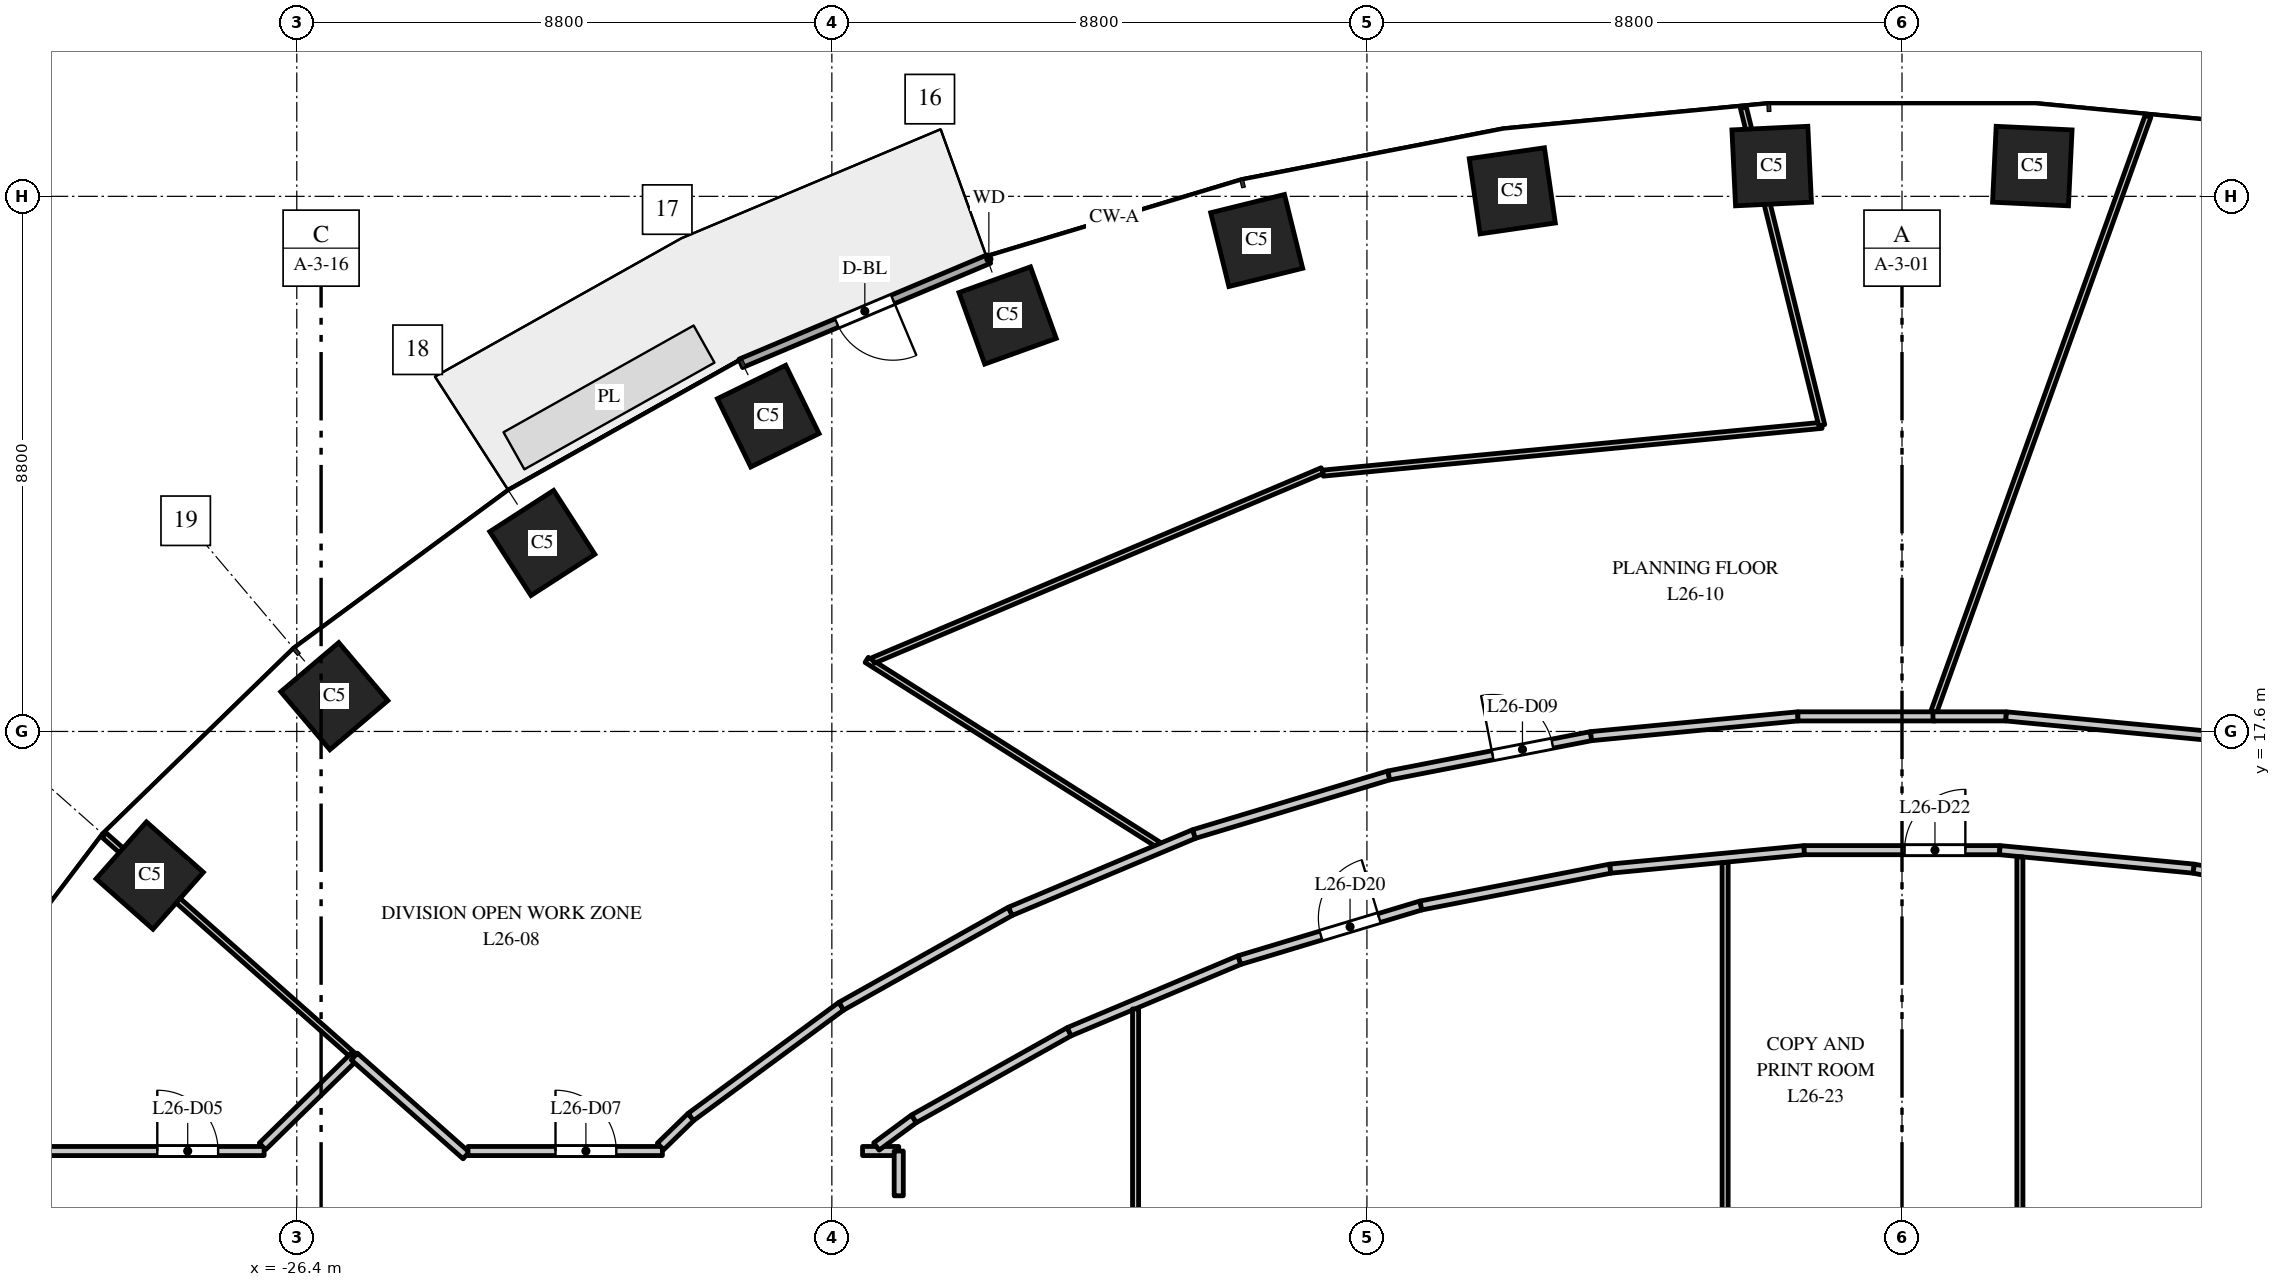
"""IFC4 building model, lengths in metres.
Left out: names, types, materials, properties, quantities, classifications, styles, units other than length and angle.
Written with IfcOpenShell. Run it as: python <this file> out.ifc"""

import sys

from ifc_helpers import new_model, si_unit, direction, frame, frame_2d, origin, origin_2d, place, context, subcontext, project, spatial, rectangle, extrude, element, fill, save


model = new_model("IFC4")
c1 = context("Model", 3, precision=1e-05, world=origin(), true_north=direction((0.0, 1.0)))
c2 = subcontext(c1, "Body", "Model", "MODEL_VIEW")
j1 = project(units=[si_unit("LENGTHUNIT", "METRE"), si_unit("PLANEANGLEUNIT", "RADIAN")], contexts=[c1])
p1 = place(None, origin())
s1 = spatial("IfcSite", under=j1, at=p1, CompositionType="ELEMENT")
p2 = place(p1, origin())
s2 = spatial("IfcBuilding", under=s1, at=p2, CompositionType="ELEMENT")
p3 = place(p2, frame((0.0, 0.0, 116.0)))
s3 = spatial("IfcBuildingStorey", under=s2, at=p3, CompositionType="ELEMENT", Elevation=116.0)
for number, where, z_axis, x_axis in (
    (1, (2.143, 26.898, 0.0), (0.0, 0.0, 1.0), (-0.999, 0.048, 0.0)),
    (2, (-2.143, 26.898, 0.0), (0.0, 0.0, 1.0), (-0.999, -0.048, 0.0)),
    (3, (-6.409, 26.491, 0.0), (0.0, 0.0, 1.0), (-0.99, -0.143, 0.0)),
    (4, (-10.613, 25.674, 0.0), (0.0, 0.0, 1.0), (-0.971, -0.24, 0.0)),
    (5, (-14.709, 24.441, 0.0), (0.0, 0.0, 1.0), (-0.941, -0.338, 0.0)),
    (6, (-18.646, 22.785, 0.0), (0.0, 0.0, 1.0), (-0.898, -0.439, 0.0)),
    (7, (-22.362, 20.7, 0.0), (0.0, 0.0, 1.0), (-0.84, -0.542, 0.0)),
    (8, (-25.783, 18.18, 0.0), (0.0, 0.0, 1.0), (-0.763, -0.646, 0.0)),
    (9, (-28.819, 15.23, 0.0), (0.0, 0.0, 1.0), (-0.663, -0.749, 0.0)),
):
    element("IfcColumn", number, at=place(p3, frame(where, z_axis=z_axis, x_axis=x_axis)), inside=s3, PredefinedType="COLUMN", context=c2, shape_type="SweptSolid", body=[
        extrude(rectangle(XDim=1.25, YDim=1.25, at=origin_2d()), origin(), (0.0, 0.0, 1.0), 4.0),
    ])
p4 = place(p3, frame((-15.018, 25.369, 0.0), z_axis=(0.0, 0.0, 1.0), x_axis=(-0.921816985161, -0.387625393736, 0.0)))
e10 = element("IfcWall", 10, at=p4, inside=s3, PredefinedType="STANDARD", context=c2, shape_type="SweptSolid", body=[
    extrude(rectangle(XDim=4.426, YDim=0.15, at=frame_2d((2.213, 0.0))), origin(), (0.0, 0.0, 1.0), 3.7),
])
p5 = place(p4, frame((1.713, 0.0, 0.0)))
e11 = element("IfcOpeningElement", 11, at=p5, cuts=e10, PredefinedType="OPENING", context=c2, shape_type="SweptSolid", body=[
    extrude(rectangle(XDim=1.0, YDim=2.4, at=frame_2d((0.5, 1.2))), frame((0.0, 0.085, 0.0), z_axis=(0.0, -1.0, 0.0), x_axis=(1.0, 0.0, 0.0)), (0.0, 0.0, 1.0), 0.17),
])
p6 = place(p3, frame((-31.5, 10.7, 0.0), z_axis=(0.0, 0.0, 1.0), x_axis=(1.0, 0.0, 0.0)))
e12 = element("IfcWall", 12, at=p6, inside=s3, PredefinedType="PARTITIONING", context=c2, shape_type="SweptSolid", body=[
    extrude(rectangle(XDim=4.563, YDim=0.15, at=frame_2d((2.281, 0.0))), origin(), (0.0, 0.0, 1.0), 3.1),
])
p7 = place(p6, frame((2.806, 0.0, 0.0)))
e13 = element("IfcOpeningElement", 13, at=p7, cuts=e12, PredefinedType="OPENING", context=c2, shape_type="SweptSolid", body=[
    extrude(rectangle(XDim=1.0, YDim=2.1, at=frame_2d((0.5, 1.05))), frame((0.0, 0.085, 0.0), z_axis=(0.0, -1.0, 0.0), x_axis=(1.0, 0.0, 0.0)), (0.0, 0.0, 1.0), 0.17),
])
p8 = place(p3, frame((-29.569, 15.895, 0.0), z_axis=(0.0, 0.0, 1.0), x_axis=(0.74891259533, -0.662668789484, 0.0)))
e14 = element("IfcWall", 14, at=p8, inside=s3, PredefinedType="PARTITIONING", context=c2, shape_type="SweptSolid", body=[
    extrude(rectangle(XDim=5.495, YDim=0.1, at=frame_2d((2.747, 0.0))), origin(), (0.0, 0.0, 1.0), 2.9),
])
p9 = place(p3, frame((-26.964, 10.777, 0.0), z_axis=(0.0, 0.0, 1.0), x_axis=(0.714923203438, 0.699202984251, 0.0)))
e15 = element("IfcWall", 15, at=p9, inside=s3, PredefinedType="PARTITIONING", context=c2, shape_type="SweptSolid", body=[
    extrude(rectangle(XDim=2.112, YDim=0.15, at=frame_2d((1.056, 0.0))), origin(), (0.0, 0.0, 1.0), 3.7),
])
p10 = place(p3, frame((-25.454, 12.254, 0.0), z_axis=(0.0, 0.0, 1.0), x_axis=(0.74918446265, -0.662361412617, 0.0)))
e16 = element("IfcWall", 16, at=p10, inside=s3, PredefinedType="PARTITIONING", context=c2, shape_type="SweptSolid", body=[
    extrude(rectangle(XDim=2.455, YDim=0.15, at=frame_2d((1.228, 0.0))), origin(), (0.0, 0.0, 1.0), 3.7),
])
p11 = place(p3, frame((-23.584, 10.7, 0.0), z_axis=(0.0, 0.0, 1.0), x_axis=(1.0, 0.0, 0.0)))
e17 = element("IfcWall", 17, at=p11, inside=s3, PredefinedType="PARTITIONING", context=c2, shape_type="SweptSolid", body=[
    extrude(rectangle(XDim=3.197, YDim=0.15, at=frame_2d((1.599, 0.0))), origin(), (0.0, 0.0, 1.0), 3.7),
])
p12 = place(p11, frame((1.439, 0.0, 0.0)))
e18 = element("IfcOpeningElement", 18, at=p12, cuts=e17, PredefinedType="OPENING", context=c2, shape_type="SweptSolid", body=[
    extrude(rectangle(XDim=1.0, YDim=2.1, at=frame_2d((0.5, 1.05))), frame((0.0, 0.085, 0.0), z_axis=(0.0, -1.0, 0.0), x_axis=(1.0, 0.0, 0.0)), (0.0, 0.0, 1.0), 0.17),
])
p13 = place(p3, frame((-20.418, 10.775, 0.0), z_axis=(0.0, 0.0, 1.0), x_axis=(0.717033879939, 0.697038316751, 0.0)))
e19 = element("IfcWall", 19, at=p13, inside=s3, PredefinedType="PARTITIONING", context=c2, shape_type="SweptSolid", body=[
    extrude(rectangle(XDim=0.696, YDim=0.15, at=frame_2d((0.348, 0.0))), origin(), (0.0, 0.0, 1.0), 3.7),
])
p14 = place(p3, frame((-19.919, 11.26, 0.0), z_axis=(0.0, 0.0, 1.0), x_axis=(0.805185638843, 0.593022838516, 0.0)))
e20 = element("IfcWall", 20, at=p14, inside=s3, PredefinedType="PARTITIONING", context=c2, shape_type="SweptSolid", body=[
    extrude(rectangle(XDim=3.073, YDim=0.15, at=frame_2d((1.536, 0.0))), origin(), (0.0, 0.0, 1.0), 2.75),
])
p15 = place(p3, frame((-17.445, 13.082, 0.0), z_axis=(0.0, 0.0, 1.0), x_axis=(0.872072095629, 0.489377420837, 0.0)))
e21 = element("IfcWall", 21, at=p15, inside=s3, PredefinedType="PARTITIONING", context=c2, shape_type="SweptSolid", body=[
    extrude(rectangle(XDim=3.188, YDim=0.15, at=frame_2d((1.594, 0.0))), origin(), (0.0, 0.0, 1.0), 3.7),
])
p16 = place(p3, frame((-17.027, 18.777, 0.0), z_axis=(0.0, 0.0, 1.0), x_axis=(0.844786602714, -0.535103350648, 0.0)))
e22 = element("IfcWall", 22, at=p16, inside=s3, PredefinedType="PARTITIONING", context=c2, shape_type="SweptSolid", body=[
    extrude(rectangle(XDim=5.664, YDim=0.1, at=frame_2d((2.832, 0.0))), origin(), (0.0, 0.0, 1.0), 2.85),
])
p17 = place(p3, frame((-16.92, 18.768, 0.0), z_axis=(0.0, 0.0, 1.0), x_axis=(0.921120541754, 0.389277468599, 0.0)))
e23 = element("IfcWall", 23, at=p17, inside=s3, PredefinedType="PARTITIONING", context=c2, shape_type="SweptSolid", body=[
    extrude(rectangle(XDim=8.02, YDim=0.1, at=frame_2d((4.01, 0.0))), origin(), (0.0, 0.0, 1.0), 2.85),
])
p18 = place(p3, frame((-17.095, 10.7, 0.0), z_axis=(0.0, 0.0, 1.0), x_axis=(1.0, 0.0, 0.0)))
e24 = element("IfcWall", 24, at=p18, inside=s3, PredefinedType="PARTITIONING", context=c2, shape_type="SweptSolid", body=[
    extrude(rectangle(XDim=0.595, YDim=0.15, at=frame_2d((0.297, 0.0))), origin(), (0.0, 0.0, 1.0), 3.7),
])
p19 = place(p3, frame((-16.867, 10.775, 0.0), z_axis=(0.0, 0.0, 1.0), x_axis=(0.804751563869, 0.593611759023, 0.0)))
e25 = element("IfcWall", 25, at=p19, inside=s3, PredefinedType="PARTITIONING", context=c2, shape_type="SweptSolid", body=[
    extrude(rectangle(XDim=0.767, YDim=0.15, at=frame_2d((0.383, 0.0))), origin(), (0.0, 0.0, 1.0), 3.7),
])
p20 = place(p3, frame((-16.5, 9.964, 0.0), z_axis=(0.0, 0.0, 1.0), x_axis=(0.0, 1.0, 0.0)))
e26 = element("IfcWall", 26, at=p20, inside=s3, PredefinedType="PARTITIONING", context=c2, shape_type="SweptSolid", body=[
    extrude(rectangle(XDim=0.736, YDim=0.15, at=frame_2d((0.368, 0.0))), origin(), (0.0, 0.0, 1.0), 3.7),
])
p21 = place(p3, frame((-16.25, 11.23, 0.0), z_axis=(0.0, 0.0, 1.0), x_axis=(0.872147381065, 0.489243237767, 0.0)))
e27 = element("IfcWall", 27, at=p21, inside=s3, PredefinedType="PARTITIONING", context=c2, shape_type="SweptSolid", body=[
    extrude(rectangle(XDim=2.927, YDim=0.15, at=frame_2d((1.464, 0.0))), origin(), (0.0, 0.0, 1.0), 2.75),
])
p22 = place(p3, frame((-14.665, 14.642, 0.0), z_axis=(0.0, 0.0, 1.0), x_axis=(0.921789499058, 0.38769075231, 0.0)))
e28 = element("IfcWall", 28, at=p22, inside=s3, PredefinedType="PARTITIONING", context=c2, shape_type="SweptSolid", body=[
    extrude(rectangle(XDim=3.278, YDim=0.15, at=frame_2d((1.639, 0.0))), origin(), (0.0, 0.0, 1.0), 2.85),
])
p23 = place(p3, frame((-13.697, 12.662, 0.0), z_axis=(0.0, 0.0, 1.0), x_axis=(0.921751821358, 0.387780324183, 0.0)))
e29 = element("IfcWall", 29, at=p23, inside=s3, PredefinedType="PARTITIONING", context=c2, shape_type="SweptSolid", body=[
    extrude(rectangle(XDim=3.038, YDim=0.15, at=frame_2d((1.519, 0.0))), origin(), (0.0, 0.0, 1.0), 2.85),
])
p24 = place(p3, frame((-12.605, -13.036, 0.0), z_axis=(0.0, 0.0, 1.0), x_axis=(0.0, 1.0, 0.0)))
e30 = element("IfcWall", 30, at=p24, inside=s3, PredefinedType="PARTITIONING", context=c2, shape_type="SweptSolid", body=[
    extrude(rectangle(XDim=26.072, YDim=0.1, at=frame_2d((13.036, 0.0))), origin(), (0.0, 0.0, 1.0), 2.75),
])
p25 = place(p3, frame((-11.643, 15.913, 0.0), z_axis=(0.0, 0.0, 1.0), x_axis=(0.957584891346, 0.288151307243, 0.0)))
e31 = element("IfcWall", 31, at=p25, inside=s3, PredefinedType="PARTITIONING", context=c2, shape_type="SweptSolid", body=[
    extrude(rectangle(XDim=3.345, YDim=0.15, at=frame_2d((1.672, 0.0))), origin(), (0.0, 0.0, 1.0), 3.7),
])
p26 = place(p3, frame((-10.897, 13.84, 0.0), z_axis=(0.0, 0.0, 1.0), x_axis=(0.957606118849, 0.28808075455, 0.0)))
e32 = element("IfcWall", 32, at=p26, inside=s3, PredefinedType="PARTITIONING", context=c2, shape_type="SweptSolid", body=[
    extrude(rectangle(XDim=3.117, YDim=0.15, at=frame_2d((1.559, 0.0))), origin(), (0.0, 0.0, 1.0), 3.7),
])
p27 = place(p26, frame((1.4, 0.0, 0.0)))
e33 = element("IfcOpeningElement", 33, at=p27, cuts=e32, PredefinedType="OPENING", context=c2, shape_type="SweptSolid", body=[
    extrude(rectangle(XDim=1.0, YDim=2.1, at=frame_2d((0.5, 1.05))), frame((0.0, 0.085, 0.0), z_axis=(0.0, -1.0, 0.0), x_axis=(1.0, 0.0, 0.0)), (0.0, 0.0, 1.0), 0.17),
])
p28 = place(p3, frame((-9.523, 21.848, 0.0), z_axis=(0.0, 0.0, 1.0), x_axis=(0.99544018458, 0.095387834251, 0.0)))
e34 = element("IfcWall", 34, at=p28, inside=s3, PredefinedType="PARTITIONING", context=c2, shape_type="SweptSolid", body=[
    extrude(rectangle(XDim=8.241, YDim=0.1, at=frame_2d((4.121, 0.0))), origin(), (0.0, 0.0, 1.0), 2.85),
])
p29 = place(p3, frame((-8.44, 16.877, 0.0), z_axis=(0.0, 0.0, 1.0), x_axis=(0.981665220565, 0.190613207134, 0.0)))
e35 = element("IfcWall", 35, at=p29, inside=s3, PredefinedType="PARTITIONING", context=c2, shape_type="SweptSolid", body=[
    extrude(rectangle(XDim=3.389, YDim=0.15, at=frame_2d((1.695, 0.0))), origin(), (0.0, 0.0, 1.0), 2.85),
])
p30 = place(p29, frame((1.739, 0.0, 0.0)))
e36 = element("IfcOpeningElement", 36, at=p30, cuts=e35, PredefinedType="OPENING", context=c2, shape_type="SweptSolid", body=[
    extrude(rectangle(XDim=1.0, YDim=2.1, at=frame_2d((0.5, 1.05))), frame((0.0, 0.085, 0.0), z_axis=(0.0, -1.0, 0.0), x_axis=(1.0, 0.0, 0.0)), (0.0, 0.0, 1.0), 0.17),
])
p31 = place(p3, frame((-7.912, 14.738, 0.0), z_axis=(0.0, 0.0, 1.0), x_axis=(0.981588545092, 0.191007665145, 0.0)))
e37 = element("IfcWall", 37, at=p31, inside=s3, PredefinedType="PARTITIONING", context=c2, shape_type="SweptSolid", body=[
    extrude(rectangle(XDim=3.172, YDim=0.15, at=frame_2d((1.586, 0.0))), origin(), (0.0, 0.0, 1.0), 2.85),
])
p32 = place(p3, frame((-5.113, 17.523, 0.0), z_axis=(0.0, 0.0, 1.0), x_axis=(0.995466844572, 0.095109207532, 0.0)))
e38 = element("IfcWall", 38, at=p32, inside=s3, PredefinedType="PARTITIONING", context=c2, shape_type="SweptSolid", body=[
    extrude(rectangle(XDim=3.417, YDim=0.15, at=frame_2d((1.708, 0.0))), origin(), (0.0, 0.0, 1.0), 3.7),
])
p33 = place(p3, frame((-4.798, 15.344, 0.0), z_axis=(0.0, 0.0, 1.0), x_axis=(0.995491705426, 0.09484863957, 0.0)))
e39 = element("IfcWall", 39, at=p33, inside=s3, PredefinedType="PARTITIONING", context=c2, shape_type="SweptSolid", body=[
    extrude(rectangle(XDim=3.205, YDim=0.15, at=frame_2d((1.602, 0.0))), origin(), (0.0, 0.0, 1.0), 3.7),
])
p34 = place(p3, frame((-2.909, 7.082, 0.0), z_axis=(0.0, 0.0, 1.0), x_axis=(0.0, 1.0, 0.0)))
e40 = element("IfcWall", 40, at=p34, inside=s3, PredefinedType="PARTITIONING", context=c2, shape_type="SweptSolid", body=[
    extrude(rectangle(XDim=8.363, YDim=0.1, at=frame_2d((4.182, 0.0))), origin(), (0.0, 0.0, 1.0), 2.9),
])
p35 = place(p3, frame((-2.609, 27.858, 0.0), z_axis=(0.0, 0.0, 1.0), x_axis=(0.239705454967, -0.970845659649, 0.0)))
e41 = element("IfcWall", 41, at=p35, inside=s3, PredefinedType="PARTITIONING", context=c2, shape_type="SweptSolid", body=[
    extrude(rectangle(XDim=5.381, YDim=0.1, at=frame_2d((2.69, 0.0))), origin(), (0.0, 0.0, 1.0), 2.85),
])
p36 = place(p3, frame((-1.712, 17.848, 0.0), z_axis=(0.0, 0.0, 1.0), x_axis=(1.0, 0.0, 0.0)))
e42 = element("IfcWall", 42, at=p36, inside=s3, PredefinedType="PARTITIONING", context=c2, shape_type="SweptSolid", body=[
    extrude(rectangle(XDim=2.262, YDim=0.15, at=frame_2d((1.131, 0.0))), origin(), (0.0, 0.0, 1.0), 2.85),
])
p37 = place(p3, frame((-1.608, 15.648, 0.0), z_axis=(0.0, 0.0, 1.0), x_axis=(1.0, 0.0, 0.0)))
e43 = element("IfcWall", 43, at=p37, inside=s3, PredefinedType="PARTITIONING", context=c2, shape_type="SweptSolid", body=[
    extrude(rectangle(XDim=3.216, YDim=0.15, at=frame_2d((1.608, 0.0))), origin(), (0.0, 0.0, 1.0), 2.85),
])
p38 = place(p37, frame((1.65, 0.0, 0.0)))
e44 = element("IfcOpeningElement", 44, at=p38, cuts=e43, PredefinedType="OPENING", context=c2, shape_type="SweptSolid", body=[
    extrude(rectangle(XDim=1.0, YDim=2.1, at=frame_2d((0.5, 1.05))), frame((0.0, 0.085, 0.0), z_axis=(0.0, -1.0, 0.0), x_axis=(1.0, 0.0, 0.0)), (0.0, 0.0, 1.0), 0.17),
])
p39 = place(p3, frame((0.523, 17.923, 0.0), z_axis=(0.0, 0.0, 1.0), x_axis=(0.338475258228, 0.940975291688, 0.0)))
e45 = element("IfcWall", 45, at=p39, inside=s3, PredefinedType="PARTITIONING", context=c2, shape_type="SweptSolid", body=[
    extrude(rectangle(XDim=10.408, YDim=0.1, at=frame_2d((5.204, 0.0))), origin(), (0.0, 0.0, 1.0), 2.9),
])
p40 = place(p3, frame((0.509, 17.848, 0.0), z_axis=(0.0, 0.0, 1.0), x_axis=(1.0, 0.0, 0.0)))
e46 = element("IfcWall", 46, at=p40, inside=s3, PredefinedType="PARTITIONING", context=c2, shape_type="SweptSolid", body=[
    extrude(rectangle(XDim=1.203, YDim=0.15, at=frame_2d((0.602, 0.0))), origin(), (0.0, 0.0, 1.0), 3.7),
])
p41 = place(p3, frame((1.608, 15.648, 0.0), z_axis=(0.0, 0.0, 1.0), x_axis=(0.995491705426, -0.09484863957, 0.0)))
e47 = element("IfcWall", 47, at=p41, inside=s3, PredefinedType="PARTITIONING", context=c2, shape_type="SweptSolid", body=[
    extrude(rectangle(XDim=3.205, YDim=0.15, at=frame_2d((1.602, 0.0))), origin(), (0.0, 0.0, 1.0), 2.85),
])
p42 = place(p3, frame((1.712, 17.848, 0.0), z_axis=(0.0, 0.0, 1.0), x_axis=(0.995466844572, -0.095109207532, 0.0)))
e48 = element("IfcWall", 48, at=p42, inside=s3, PredefinedType="PARTITIONING", context=c2, shape_type="SweptSolid", body=[
    extrude(rectangle(XDim=3.417, YDim=0.15, at=frame_2d((1.708, 0.0))), origin(), (0.0, 0.0, 1.0), 2.85),
])
p43 = place(p3, frame((1.939, 7.307, 0.0), z_axis=(0.0, 0.0, 1.0), x_axis=(0.0, 1.0, 0.0)))
e49 = element("IfcWall", 49, at=p43, inside=s3, PredefinedType="PARTITIONING", context=c2, shape_type="SweptSolid", body=[
    extrude(rectangle(XDim=8.23, YDim=0.1, at=frame_2d((4.115, 0.0))), origin(), (0.0, 0.0, 1.0), 2.85),
])
p44 = place(p3, frame((4.798, 15.344, 0.0), z_axis=(0.0, 0.0, 1.0), x_axis=(0.981588545092, -0.191007665145, 0.0)))
e50 = element("IfcWall", 50, at=p44, inside=s3, PredefinedType="PARTITIONING", context=c2, shape_type="SweptSolid", body=[
    extrude(rectangle(XDim=3.172, YDim=0.15, at=frame_2d((1.586, 0.0))), origin(), (0.0, 0.0, 1.0), 3.7),
])
p45 = place(p5, origin())
e51 = element("IfcDoor", 51, at=p45, inside=s3, OperationType="SINGLE_SWING_LEFT", PredefinedType="DOOR", context=c2, shape_type="SweptSolid", body=[
    extrude(rectangle(XDim=1.0, YDim=2.4, at=frame_2d((0.5, 1.2))), frame((0.0, 0.025, 0.0), z_axis=(0.0, -1.0, 0.0), x_axis=(1.0, 0.0, 0.0)), (0.0, 0.0, 1.0), 0.05),
])
fill(e11, e51)
p46 = place(p7, origin())
e52 = element("IfcDoor", 52, at=p46, inside=s3, OperationType="SINGLE_SWING_LEFT", PredefinedType="DOOR", context=c2, shape_type="SweptSolid", body=[
    extrude(rectangle(XDim=1.0, YDim=2.1, at=frame_2d((0.5, 1.05))), frame((0.0, 0.025, 0.0), z_axis=(0.0, -1.0, 0.0), x_axis=(1.0, 0.0, 0.0)), (0.0, 0.0, 1.0), 0.05),
])
fill(e13, e52)
p47 = place(p12, origin())
e53 = element("IfcDoor", 53, at=p47, inside=s3, OperationType="SINGLE_SWING_LEFT", PredefinedType="DOOR", context=c2, shape_type="SweptSolid", body=[
    extrude(rectangle(XDim=1.0, YDim=2.1, at=frame_2d((0.5, 1.05))), frame((0.0, 0.025, 0.0), z_axis=(0.0, -1.0, 0.0), x_axis=(1.0, 0.0, 0.0)), (0.0, 0.0, 1.0), 0.05),
])
fill(e18, e53)
p48 = place(p30, origin())
e54 = element("IfcDoor", 54, at=p48, inside=s3, OperationType="SINGLE_SWING_LEFT", PredefinedType="DOOR", context=c2, shape_type="SweptSolid", body=[
    extrude(rectangle(XDim=1.0, YDim=2.1, at=frame_2d((0.5, 1.05))), frame((0.0, 0.025, 0.0), z_axis=(0.0, -1.0, 0.0), x_axis=(1.0, 0.0, 0.0)), (0.0, 0.0, 1.0), 0.05),
])
fill(e36, e54)
p49 = place(p27, origin())
e55 = element("IfcDoor", 55, at=p49, inside=s3, OperationType="SINGLE_SWING_RIGHT", PredefinedType="DOOR", context=c2, shape_type="SweptSolid", body=[
    extrude(rectangle(XDim=1.0, YDim=2.1, at=frame_2d((0.5, 1.05))), frame((0.0, 0.025, 0.0), z_axis=(0.0, -1.0, 0.0), x_axis=(1.0, 0.0, 0.0)), (0.0, 0.0, 1.0), 0.05),
])
fill(e33, e55)
p50 = place(p38, origin())
e56 = element("IfcDoor", 56, at=p50, inside=s3, OperationType="SINGLE_SWING_RIGHT", PredefinedType="DOOR", context=c2, shape_type="SweptSolid", body=[
    extrude(rectangle(XDim=1.0, YDim=2.1, at=frame_2d((0.5, 1.05))), frame((0.0, 0.025, 0.0), z_axis=(0.0, -1.0, 0.0), x_axis=(1.0, 0.0, 0.0)), (0.0, 0.0, 1.0), 0.05),
])
fill(e44, e56)
save(model, sys.argv[1])
